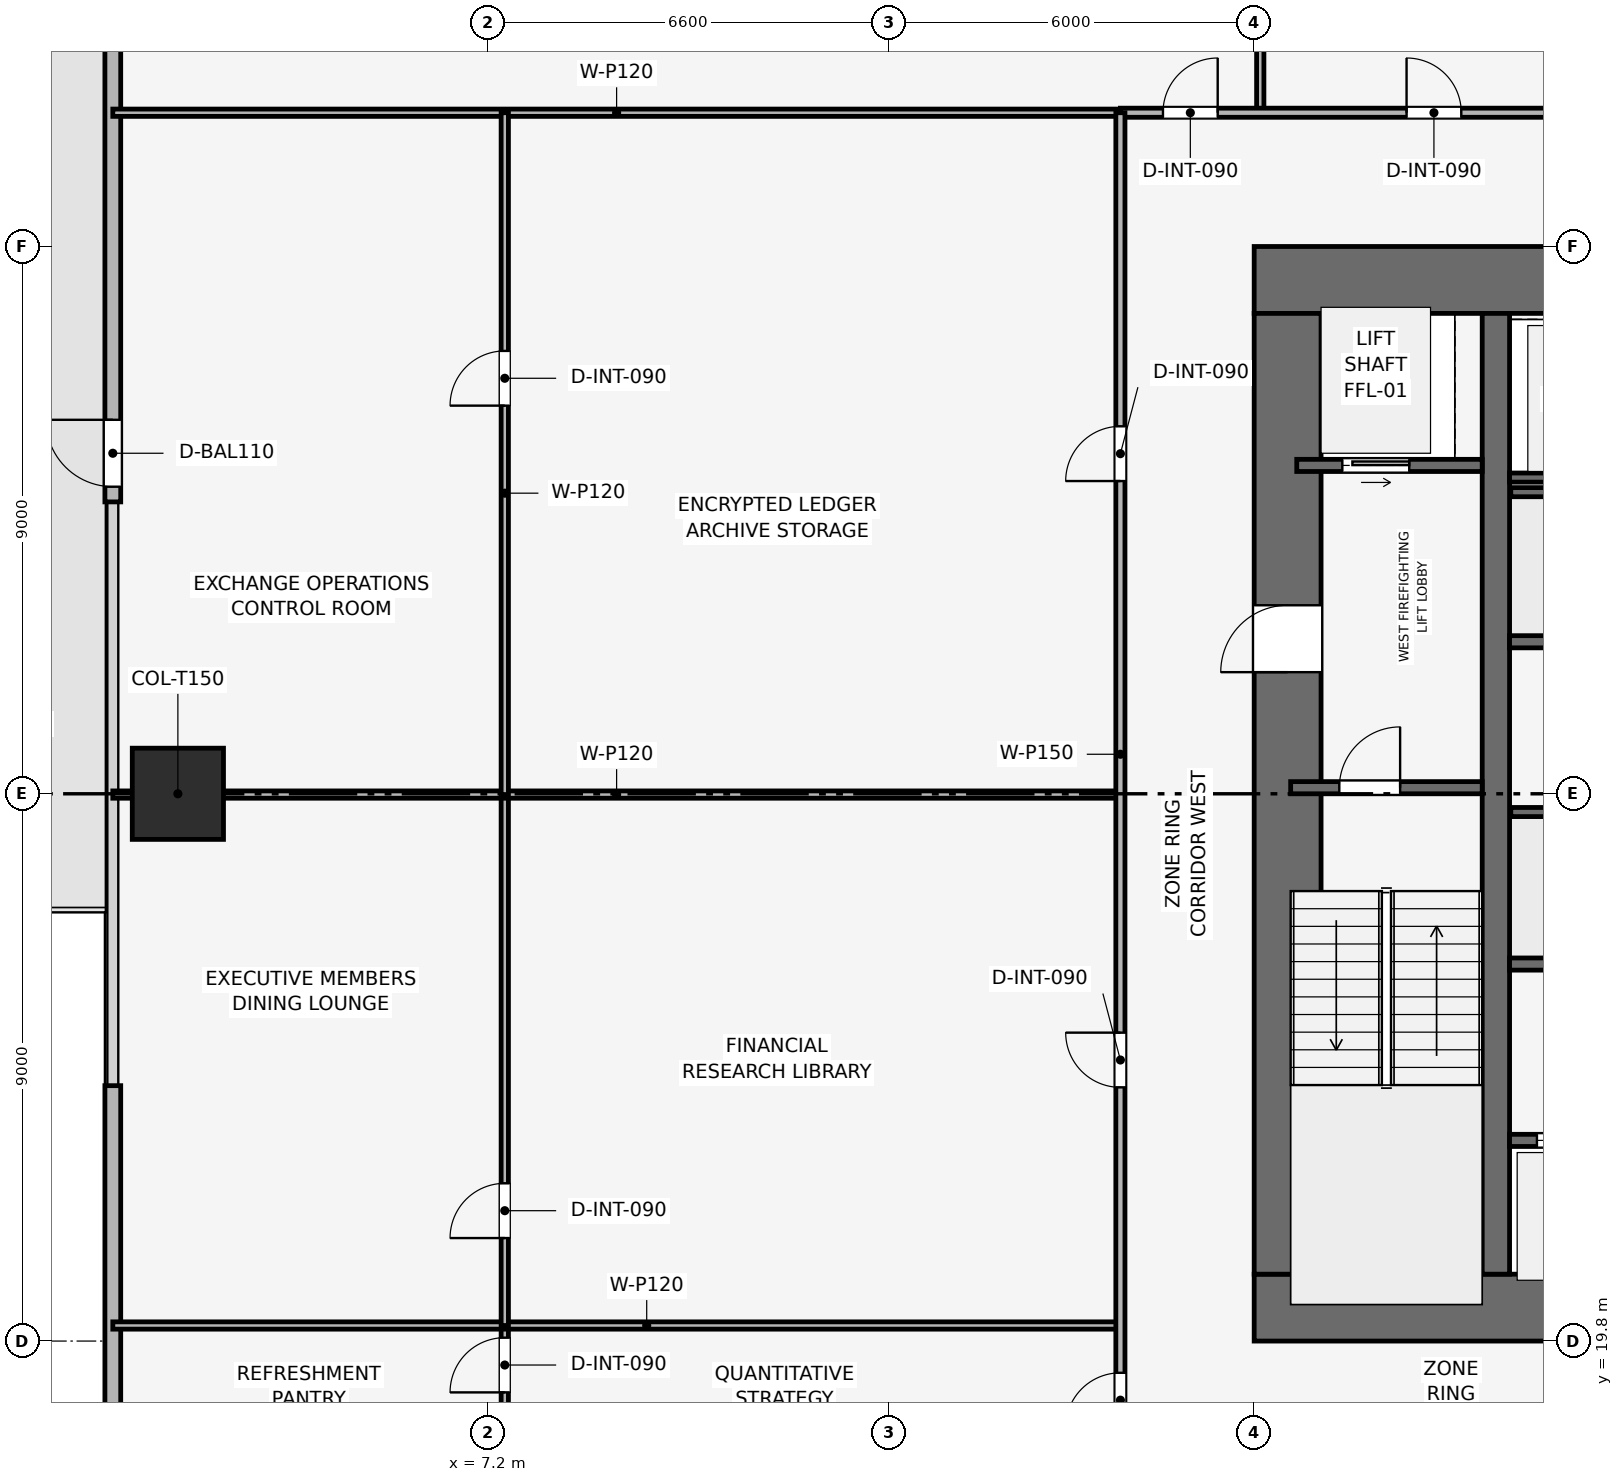
"""IFC4 building model, lengths in metres.
Left out: names, types, materials, properties, quantities, classifications, styles, units other than length and angle.
Written with IfcOpenShell. Run it as: python <this file> out.ifc"""

import sys

from ifc_helpers import new_model, si_unit, direction, frame, frame_2d, origin, origin_2d, place, context, subcontext, project, spatial, rectangle, extrude, element, fill, save


model = new_model("IFC4")
c1 = context("Model", 3, precision=1e-05, world=origin(), true_north=direction((0.0, 1.0)))
c2 = subcontext(c1, "Body", "Model", "MODEL_VIEW")
j1 = project(units=[si_unit("LENGTHUNIT", "METRE"), si_unit("PLANEANGLEUNIT", "RADIAN")], contexts=[c1])
p1 = place(None, origin())
s1 = spatial("IfcSite", under=j1, at=p1, CompositionType="ELEMENT")
p2 = place(p1, origin())
s2 = spatial("IfcBuilding", under=s1, at=p2, CompositionType="ELEMENT")
p3 = place(p2, frame((0.0, 0.0, 100.2)))
s3 = spatial("IfcBuildingStorey", under=s2, at=p3, CompositionType="ELEMENT", Elevation=100.2)
p4 = place(p3, frame((19.8, 20.35, 0.0), z_axis=(0.0, 0.0, 1.0), x_axis=(1.0, 0.0, 0.0)))
e1 = element("IfcWall", 1, at=p4, inside=s3, PredefinedType="SHEAR", context=c2, shape_type="SweptSolid", body=[
    extrude(rectangle(XDim=18.0, YDim=1.1, at=frame_2d((9.0, 0.0))), origin(), (0.0, 0.0, 1.0), 3.9),
])
p5 = place(p4, frame((8.4, 0.0, 0.0)))
e2 = element("IfcOpeningElement", 2, at=p5, cuts=e1, PredefinedType="OPENING", context=c2, shape_type="SweptSolid", body=[
    extrude(rectangle(XDim=1.2, YDim=2.2, at=frame_2d((0.6, 1.1))), frame((0.0, 0.56, 0.0), z_axis=(0.0, -1.0, 0.0), x_axis=(1.0, 0.0, 0.0)), (0.0, 0.0, 1.0), 1.12),
])
p6 = place(p3, frame((19.8, 37.25, 0.0), z_axis=(0.0, 0.0, 1.0), x_axis=(1.0, 0.0, 0.0)))
e3 = element("IfcWall", 3, at=p6, inside=s3, PredefinedType="SHEAR", context=c2, shape_type="SweptSolid", body=[
    extrude(rectangle(XDim=18.0, YDim=1.1, at=frame_2d((9.0, 0.0))), origin(), (0.0, 0.0, 1.0), 3.9),
])
p7 = place(p6, frame((7.05, 0.0, 0.0)))
e4 = element("IfcOpeningElement", 4, at=p7, cuts=e3, PredefinedType="OPENING", context=c2, shape_type="SweptSolid", body=[
    extrude(rectangle(XDim=1.1, YDim=2.15, at=frame_2d((0.55, 1.075))), frame((0.0, 0.56, 0.0), z_axis=(0.0, -1.0, 0.0), x_axis=(1.0, 0.0, 0.0)), (0.0, 0.0, 1.0), 1.12),
])
p8 = place(p3, frame((20.35, 20.9, 0.0), z_axis=(0.0, 0.0, 1.0), x_axis=(0.0, 1.0, 0.0)))
e5 = element("IfcWall", 5, at=p8, inside=s3, PredefinedType="SHEAR", context=c2, shape_type="SweptSolid", body=[
    extrude(rectangle(XDim=15.8, YDim=1.1, at=frame_2d((7.9, 0.0))), origin(), (0.0, 0.0, 1.0), 3.9),
])
p9 = place(p8, frame((9.9, 0.0, 0.0)))
e6 = element("IfcOpeningElement", 6, at=p9, cuts=e5, PredefinedType="OPENING", context=c2, shape_type="SweptSolid", body=[
    extrude(rectangle(XDim=1.1, YDim=2.15, at=frame_2d((0.55, 1.075))), frame((0.0, 0.56, 0.0), z_axis=(0.0, -1.0, 0.0), x_axis=(1.0, 0.0, 0.0)), (0.0, 0.0, 1.0), 1.12),
])
p10 = place(p3, frame((23.775, 20.9, 0.0), z_axis=(0.0, 0.0, 1.0), x_axis=(0.0, 1.0, 0.0)))
e7 = element("IfcWall", 7, at=p10, inside=s3, PredefinedType="SHEAR", context=c2, shape_type="SweptSolid", body=[
    extrude(rectangle(XDim=15.8, YDim=0.45, at=frame_2d((7.9, 0.0))), origin(), (0.0, 0.0, 1.0), 3.9),
])
p11 = place(p3, frame((2.1, 28.8, 0.003), z_axis=(0.0, 0.0, 1.0), x_axis=(1.0, 0.0, 0.0)))
e8 = element("IfcColumn", 8, at=p11, inside=s3, PredefinedType="COLUMN", context=c2, shape_type="SweptSolid", body=[
    extrude(rectangle(XDim=1.5, YDim=1.5, at=origin_2d()), origin(), (0.0, 0.0, 1.0), 3.644),
])
p12 = place(p3, frame((1.03, 8.7, 0.0), z_axis=(0.0, 0.0, 1.0), x_axis=(0.0, 1.0, 0.0)))
e9 = element("IfcWall", 9, at=p12, inside=s3, PredefinedType="SOLIDWALL", context=c2, shape_type="SweptSolid", body=[
    extrude(rectangle(XDim=15.3, YDim=0.26, at=frame_2d((7.65, 0.0))), origin(), (0.0, 0.0, 1.0), 3.65),
])
p13 = place(p12, frame((0.25, 0.0, 0.9)))
e10 = element("IfcOpeningElement", 10, at=p13, cuts=e9, PredefinedType="OPENING", context=c2, shape_type="SweptSolid", body=[
    extrude(rectangle(XDim=3.8, YDim=1.9, at=frame_2d((1.9, 0.95))), frame((0.0, 0.14, 0.0), z_axis=(0.0, -1.0, 0.0), x_axis=(1.0, 0.0, 0.0)), (0.0, 0.0, 1.0), 0.28),
])
p14 = place(p3, frame((1.03, 33.6, 0.0), z_axis=(0.0, 0.0, 1.0), x_axis=(0.0, 1.0, 0.0)))
e11 = element("IfcWall", 11, at=p14, inside=s3, PredefinedType="SOLIDWALL", context=c2, shape_type="SweptSolid", body=[
    extrude(rectangle(XDim=15.3, YDim=0.26, at=frame_2d((7.65, 0.0))), origin(), (0.0, 0.0, 1.0), 3.65),
])
p15 = place(p14, frame((0.25, 0.0, 0.0)))
e12 = element("IfcOpeningElement", 12, at=p15, cuts=e11, PredefinedType="OPENING", context=c2, shape_type="SweptSolid", body=[
    extrude(rectangle(XDim=1.1, YDim=2.2, at=frame_2d((0.55, 1.1))), frame((0.0, 0.14, 0.0), z_axis=(0.0, -1.0, 0.0), x_axis=(1.0, 0.0, 0.0)), (0.0, 0.0, 1.0), 0.28),
])
p16 = place(p3, frame((20.4, 28.9, 0.0), z_axis=(0.0, 0.0, 1.0), x_axis=(1.0, 0.0, 0.0)))
e13 = element("IfcWall", 13, at=p16, inside=s3, PredefinedType="SHEAR", context=c2, shape_type="SweptSolid", body=[
    extrude(rectangle(XDim=3.15, YDim=0.2, at=frame_2d((1.575, 0.0))), origin(), (0.0, 0.0, 1.0), 3.65),
])
p17 = place(p16, frame((0.8, 0.0, 0.0)))
e14 = element("IfcOpeningElement", 14, at=p17, cuts=e13, PredefinedType="OPENING", context=c2, shape_type="SweptSolid", body=[
    extrude(rectangle(XDim=1.0, YDim=2.1, at=frame_2d((0.5, 1.05))), frame((0.0, 0.11, 0.0), z_axis=(0.0, -1.0, 0.0), x_axis=(1.0, 0.0, 0.0)), (0.0, 0.0, 1.0), 0.22),
])
p18 = place(p3, frame((20.5, 34.2, 0.0), z_axis=(0.0, 0.0, 1.0), x_axis=(1.0, 0.0, 0.0)))
e15 = element("IfcWall", 15, at=p18, inside=s3, PredefinedType="SHEAR", context=c2, shape_type="SweptSolid", body=[
    extrude(rectangle(XDim=3.05, YDim=0.2, at=frame_2d((1.525, 0.0))), origin(), (0.0, 0.0, 1.0), 3.65),
])
p19 = place(p18, frame((0.75, 0.0, 0.0)))
e16 = element("IfcOpeningElement", 16, at=p19, cuts=e15, PredefinedType="OPENING", context=c2, shape_type="SweptSolid", body=[
    extrude(rectangle(XDim=1.1, YDim=2.15, at=frame_2d((0.55, 1.075))), frame((0.0, 0.11, 0.0), z_axis=(0.0, -1.0, 0.0), x_axis=(1.0, 0.0, 0.0)), (0.0, 0.0, 1.0), 0.22),
])
p20 = place(p3, frame((24.0, 34.0, 0.0), z_axis=(0.0, 0.0, 1.0), x_axis=(1.0, 0.0, 0.0)))
e17 = element("IfcWall", 17, at=p20, inside=s3, PredefinedType="SHEAR", context=c2, shape_type="SweptSolid", body=[
    extrude(rectangle(XDim=2.48, YDim=0.15, at=frame_2d((1.24, 0.0))), origin(), (0.0, 0.0, 1.0), 3.65),
])
p21 = place(p3, frame((24.0, 23.1, 0.0), z_axis=(0.0, 0.0, 1.0), x_axis=(1.0, 0.0, 0.0)))
e18 = element("IfcWall", 18, at=p21, inside=s3, PredefinedType="SHEAR", context=c2, shape_type="SweptSolid", body=[
    extrude(rectangle(XDim=2.0, YDim=0.2, at=frame_2d((1.0, 0.0))), origin(), (0.0, 0.0, 1.0), 3.65),
])
p22 = place(p21, frame((0.45, 0.0, 0.0)))
e19 = element("IfcOpeningElement", 19, at=p22, cuts=e18, PredefinedType="OPENING", context=c2, shape_type="SweptSolid", body=[
    extrude(rectangle(XDim=1.1, YDim=2.15, at=frame_2d((0.55, 1.075))), frame((0.0, 0.11, 0.0), z_axis=(0.0, -1.0, 0.0), x_axis=(1.0, 0.0, 0.0)), (0.0, 0.0, 1.0), 0.22),
])
for number, where, z_axis, x_axis in (
    (20, (24.0, 26.0, 0.0), (0.0, 0.0, 1.0), (1.0, 0.0, 0.0)),
    (21, (24.0, 31.3, 0.0), (0.0, 0.0, 1.0), (1.0, 0.0, 0.0)),
):
    element("IfcWall", number, at=place(p3, frame(where, z_axis=z_axis, x_axis=x_axis)), inside=s3, PredefinedType="SHEAR", context=c2, shape_type="SweptSolid", body=[
        extrude(rectangle(XDim=2.0, YDim=0.2, at=frame_2d((1.0, 0.0))), origin(), (0.0, 0.0, 1.0), 3.65),
    ])
for number, where, z_axis, x_axis in (
    (22, (24.02, 28.5, 0.0), (0.0, 0.0, 1.0), (1.0, 0.0, 0.0)),
    (23, (24.02, 33.76, 0.0), (0.0, 0.0, 1.0), (1.0, 0.0, 0.0)),
):
    element("IfcWall", number, at=place(p3, frame(where, z_axis=z_axis, x_axis=x_axis)), inside=s3, PredefinedType="SHEAR", context=c2, shape_type="SweptSolid", body=[
        extrude(rectangle(XDim=4.08, YDim=0.15, at=frame_2d((2.04, 0.0))), origin(), (0.0, 0.0, 1.0), 3.65),
    ])
for number, where, z_axis, x_axis in (
    (24, (19.9, 40.0, 0.0), (0.0, 0.0, 1.0), (0.0, 1.0, 0.0)),
    (25, (1.03, 40.0, 0.0), (0.0, 0.0, 1.0), (1.0, 0.0, 0.0)),
):
    element("IfcWall", number, at=place(p3, frame(where, z_axis=z_axis, x_axis=x_axis)), inside=s3, PredefinedType="PARTITIONING", context=c2, shape_type="SweptSolid", body=[
        extrude(rectangle(XDim=16.57, YDim=0.12, at=frame_2d((8.285, 0.0))), origin(), (0.0, 0.0, 1.0), 2.935),
    ])
p23 = place(p3, frame((7.476, 17.6, 0.0), z_axis=(0.0, 0.0, 1.0), x_axis=(0.0, 1.0, 0.0)))
e26 = element("IfcWall", 26, at=p23, inside=s3, PredefinedType="PARTITIONING", context=c2, shape_type="SweptSolid", body=[
    extrude(rectangle(XDim=2.456, YDim=0.12, at=frame_2d((1.228, 0.0))), origin(), (0.0, 0.0, 1.0), 3.65),
])
p24 = place(p23, frame((1.356, 0.0, 0.0)))
e27 = element("IfcOpeningElement", 27, at=p24, cuts=e26, PredefinedType="OPENING", context=c2, shape_type="SweptSolid", body=[
    extrude(rectangle(XDim=0.9, YDim=2.1, at=frame_2d((0.45, 1.05))), frame((0.0, 0.07, 0.0), z_axis=(0.0, -1.0, 0.0), x_axis=(1.0, 0.0, 0.0)), (0.0, 0.0, 1.0), 0.14),
])
p25 = place(p3, frame((1.03, 20.056, 0.0), z_axis=(0.0, 0.0, 1.0), x_axis=(1.0, 0.0, 0.0)))
e28 = element("IfcWall", 28, at=p25, inside=s3, PredefinedType="PARTITIONING", context=c2, shape_type="SweptSolid", body=[
    extrude(rectangle(XDim=16.57, YDim=0.12, at=frame_2d((8.285, 0.0))), origin(), (0.0, 0.0, 1.0), 2.935),
])
p26 = place(p3, frame((7.476, 20.056, 0.0), z_axis=(0.0, 0.0, 1.0), x_axis=(0.0, 1.0, 0.0)))
e29 = element("IfcWall", 29, at=p26, inside=s3, PredefinedType="PARTITIONING", context=c2, shape_type="SweptSolid", body=[
    extrude(rectangle(XDim=8.731, YDim=0.12, at=frame_2d((4.366, 0.0))), origin(), (0.0, 0.0, 1.0), 3.085),
])
p27 = place(p26, frame((1.438, 0.0, 0.0)))
e30 = element("IfcOpeningElement", 30, at=p27, cuts=e29, PredefinedType="OPENING", context=c2, shape_type="SweptSolid", body=[
    extrude(rectangle(XDim=0.9, YDim=2.1, at=frame_2d((0.45, 1.05))), frame((0.0, 0.07, 0.0), z_axis=(0.0, -1.0, 0.0), x_axis=(1.0, 0.0, 0.0)), (0.0, 0.0, 1.0), 0.14),
])
p28 = place(p3, frame((1.03, 28.787, 0.0), z_axis=(0.0, 0.0, 1.0), x_axis=(1.0, 0.0, 0.0)))
e31 = element("IfcWall", 31, at=p28, inside=s3, PredefinedType="PARTITIONING", context=c2, shape_type="SweptSolid", body=[
    extrude(rectangle(XDim=16.57, YDim=0.12, at=frame_2d((8.285, 0.0))), origin(), (0.0, 0.0, 1.0), 3.085),
])
p29 = place(p3, frame((7.476, 28.787, 0.0), z_axis=(0.0, 0.0, 1.0), x_axis=(0.0, 1.0, 0.0)))
e32 = element("IfcWall", 32, at=p29, inside=s3, PredefinedType="PARTITIONING", context=c2, shape_type="SweptSolid", body=[
    extrude(rectangle(XDim=11.213, YDim=0.12, at=frame_2d((5.606, 0.0))), origin(), (0.0, 0.0, 1.0), 3.085),
])
p30 = place(p29, frame((6.396, 0.0, 0.0)))
e33 = element("IfcOpeningElement", 33, at=p30, cuts=e32, PredefinedType="OPENING", context=c2, shape_type="SweptSolid", body=[
    extrude(rectangle(XDim=0.9, YDim=2.1, at=frame_2d((0.45, 1.05))), frame((0.0, 0.07, 0.0), z_axis=(0.0, -1.0, 0.0), x_axis=(1.0, 0.0, 0.0)), (0.0, 0.0, 1.0), 0.14),
])
p31 = place(p3, frame((17.6, 40.0, 0.0), z_axis=(0.0, 0.0, 1.0), x_axis=(1.0, 0.0, 0.0)))
e34 = element("IfcWall", 34, at=p31, inside=s3, PredefinedType="PARTITIONING", context=c2, shape_type="SweptSolid", body=[
    extrude(rectangle(XDim=22.4, YDim=0.15, at=frame_2d((11.2, 0.0))), origin(), (0.0, 0.0, 1.0), 3.085),
])
p32 = place(p31, frame((0.7, 0.0, 0.0)))
e35 = element("IfcOpeningElement", 35, at=p32, cuts=e34, PredefinedType="OPENING", context=c2, shape_type="SweptSolid", body=[
    extrude(rectangle(XDim=0.9, YDim=2.1, at=frame_2d((0.45, 1.05))), frame((0.0, 0.085, 0.0), z_axis=(0.0, -1.0, 0.0), x_axis=(1.0, 0.0, 0.0)), (0.0, 0.0, 1.0), 0.17),
])
p33 = place(p31, frame((4.706, 0.0, 0.0)))
e36 = element("IfcOpeningElement", 36, at=p33, cuts=e34, PredefinedType="OPENING", context=c2, shape_type="SweptSolid", body=[
    extrude(rectangle(XDim=0.9, YDim=2.1, at=frame_2d((0.45, 1.05))), frame((0.0, 0.085, 0.0), z_axis=(0.0, -1.0, 0.0), x_axis=(1.0, 0.0, 0.0)), (0.0, 0.0, 1.0), 0.17),
])
p34 = place(p31, frame((10.704, 0.0, 0.0)))
e37 = element("IfcOpeningElement", 37, at=p34, cuts=e34, PredefinedType="OPENING", context=c2, shape_type="SweptSolid", body=[
    extrude(rectangle(XDim=0.9, YDim=2.1, at=frame_2d((0.45, 1.05))), frame((0.0, 0.085, 0.0), z_axis=(0.0, -1.0, 0.0), x_axis=(1.0, 0.0, 0.0)), (0.0, 0.0, 1.0), 0.17),
])
p35 = place(p31, frame((17.898, 0.0, 0.0)))
e38 = element("IfcOpeningElement", 38, at=p35, cuts=e34, PredefinedType="OPENING", context=c2, shape_type="SweptSolid", body=[
    extrude(rectangle(XDim=0.9, YDim=2.1, at=frame_2d((0.45, 1.05))), frame((0.0, 0.085, 0.0), z_axis=(0.0, -1.0, 0.0), x_axis=(1.0, 0.0, 0.0)), (0.0, 0.0, 1.0), 0.17),
])
p36 = place(p3, frame((17.6, 17.6, 0.0), z_axis=(0.0, 0.0, 1.0), x_axis=(0.0, 1.0, 0.0)))
e39 = element("IfcWall", 39, at=p36, inside=s3, PredefinedType="PARTITIONING", context=c2, shape_type="SweptSolid", body=[
    extrude(rectangle(XDim=22.4, YDim=0.15, at=frame_2d((11.2, 0.0))), origin(), (0.0, 0.0, 1.0), 3.085),
])
p37 = place(p36, frame((0.778, 0.0, 0.0)))
e40 = element("IfcOpeningElement", 40, at=p37, cuts=e39, PredefinedType="OPENING", context=c2, shape_type="SweptSolid", body=[
    extrude(rectangle(XDim=0.9, YDim=2.1, at=frame_2d((0.45, 1.05))), frame((0.0, 0.085, 0.0), z_axis=(0.0, -1.0, 0.0), x_axis=(1.0, 0.0, 0.0)), (0.0, 0.0, 1.0), 0.17),
])
p38 = place(p36, frame((6.372, 0.0, 0.0)))
e41 = element("IfcOpeningElement", 41, at=p38, cuts=e39, PredefinedType="OPENING", context=c2, shape_type="SweptSolid", body=[
    extrude(rectangle(XDim=0.9, YDim=2.1, at=frame_2d((0.45, 1.05))), frame((0.0, 0.085, 0.0), z_axis=(0.0, -1.0, 0.0), x_axis=(1.0, 0.0, 0.0)), (0.0, 0.0, 1.0), 0.17),
])
p39 = place(p36, frame((16.343, 0.0, 0.0)))
e42 = element("IfcOpeningElement", 42, at=p39, cuts=e39, PredefinedType="OPENING", context=c2, shape_type="SweptSolid", body=[
    extrude(rectangle(XDim=0.9, YDim=2.1, at=frame_2d((0.45, 1.05))), frame((0.0, 0.085, 0.0), z_axis=(0.0, -1.0, 0.0), x_axis=(1.0, 0.0, 0.0)), (0.0, 0.0, 1.0), 0.17),
])
p40 = place(p15, origin())
e43 = element("IfcDoor", 43, at=p40, inside=s3, OperationType="SINGLE_SWING_RIGHT", PredefinedType="DOOR", context=c2, shape_type="SweptSolid", body=[
    extrude(rectangle(XDim=1.1, YDim=2.2, at=frame_2d((0.55, 1.1))), frame((0.0, 0.025, 0.0), z_axis=(0.0, -1.0, 0.0), x_axis=(1.0, 0.0, 0.0)), (0.0, 0.0, 1.0), 0.05),
])
fill(e12, e43)
p41 = place(p17, origin())
e44 = element("IfcDoor", 44, at=p41, inside=s3, OperationType="SINGLE_SWING_RIGHT", PredefinedType="DOOR", context=c2, shape_type="SweptSolid", body=[
    extrude(rectangle(XDim=1.0, YDim=2.1, at=frame_2d((0.5, 1.05))), frame((0.0, 0.025, 0.0), z_axis=(0.0, -1.0, 0.0), x_axis=(1.0, 0.0, 0.0)), (0.0, 0.0, 1.0), 0.05),
])
fill(e14, e44)
p42 = place(p19, origin())
e45 = element("IfcDoor", 45, at=p42, inside=s3, OperationType="SLIDING_TO_RIGHT", PredefinedType="DOOR", context=c2, shape_type="SweptSolid", body=[
    extrude(rectangle(XDim=1.1, YDim=2.15, at=frame_2d((0.55, 1.075))), frame((0.0, 0.025, 0.0), z_axis=(0.0, -1.0, 0.0), x_axis=(1.0, 0.0, 0.0)), (0.0, 0.0, 1.0), 0.05),
])
fill(e16, e45)
p43 = place(p22, origin())
e46 = element("IfcDoor", 46, at=p43, inside=s3, OperationType="SLIDING_TO_RIGHT", PredefinedType="DOOR", context=c2, shape_type="SweptSolid", body=[
    extrude(rectangle(XDim=1.1, YDim=2.15, at=frame_2d((0.55, 1.075))), frame((0.0, 0.025, 0.0), z_axis=(0.0, -1.0, 0.0), x_axis=(1.0, 0.0, 0.0)), (0.0, 0.0, 1.0), 0.05),
])
fill(e19, e46)
p44 = place(p24, origin())
e47 = element("IfcDoor", 47, at=p44, inside=s3, OperationType="SINGLE_SWING_LEFT", PredefinedType="DOOR", context=c2, shape_type="SweptSolid", body=[
    extrude(rectangle(XDim=0.9, YDim=2.1, at=frame_2d((0.45, 1.05))), frame((0.0, 0.025, 0.0), z_axis=(0.0, -1.0, 0.0), x_axis=(1.0, 0.0, 0.0)), (0.0, 0.0, 1.0), 0.05),
])
fill(e27, e47)
p45 = place(p27, origin())
e48 = element("IfcDoor", 48, at=p45, inside=s3, OperationType="SINGLE_SWING_LEFT", PredefinedType="DOOR", context=c2, shape_type="SweptSolid", body=[
    extrude(rectangle(XDim=0.9, YDim=2.1, at=frame_2d((0.45, 1.05))), frame((0.0, 0.025, 0.0), z_axis=(0.0, -1.0, 0.0), x_axis=(1.0, 0.0, 0.0)), (0.0, 0.0, 1.0), 0.05),
])
fill(e30, e48)
p46 = place(p30, origin())
e49 = element("IfcDoor", 49, at=p46, inside=s3, OperationType="SINGLE_SWING_LEFT", PredefinedType="DOOR", context=c2, shape_type="SweptSolid", body=[
    extrude(rectangle(XDim=0.9, YDim=2.1, at=frame_2d((0.45, 1.05))), frame((0.0, 0.025, 0.0), z_axis=(0.0, -1.0, 0.0), x_axis=(1.0, 0.0, 0.0)), (0.0, 0.0, 1.0), 0.05),
])
fill(e33, e49)
p47 = place(p32, origin())
e50 = element("IfcDoor", 50, at=p47, inside=s3, OperationType="SINGLE_SWING_RIGHT", PredefinedType="DOOR", context=c2, shape_type="SweptSolid", body=[
    extrude(rectangle(XDim=0.9, YDim=2.1, at=frame_2d((0.45, 1.05))), frame((0.0, 0.025, 0.0), z_axis=(0.0, -1.0, 0.0), x_axis=(1.0, 0.0, 0.0)), (0.0, 0.0, 1.0), 0.05),
])
fill(e35, e50)
p48 = place(p33, origin())
e51 = element("IfcDoor", 51, at=p48, inside=s3, OperationType="SINGLE_SWING_LEFT", PredefinedType="DOOR", context=c2, shape_type="SweptSolid", body=[
    extrude(rectangle(XDim=0.9, YDim=2.1, at=frame_2d((0.45, 1.05))), frame((0.0, 0.025, 0.0), z_axis=(0.0, -1.0, 0.0), x_axis=(1.0, 0.0, 0.0)), (0.0, 0.0, 1.0), 0.05),
])
fill(e36, e51)
p49 = place(p37, origin())
e52 = element("IfcDoor", 52, at=p49, inside=s3, OperationType="SINGLE_SWING_LEFT", PredefinedType="DOOR", context=c2, shape_type="SweptSolid", body=[
    extrude(rectangle(XDim=0.9, YDim=2.1, at=frame_2d((0.45, 1.05))), frame((0.0, 0.025, 0.0), z_axis=(0.0, -1.0, 0.0), x_axis=(1.0, 0.0, 0.0)), (0.0, 0.0, 1.0), 0.05),
])
fill(e40, e52)
p50 = place(p38, origin())
e53 = element("IfcDoor", 53, at=p50, inside=s3, OperationType="SINGLE_SWING_RIGHT", PredefinedType="DOOR", context=c2, shape_type="SweptSolid", body=[
    extrude(rectangle(XDim=0.9, YDim=2.1, at=frame_2d((0.45, 1.05))), frame((0.0, 0.025, 0.0), z_axis=(0.0, -1.0, 0.0), x_axis=(1.0, 0.0, 0.0)), (0.0, 0.0, 1.0), 0.05),
])
fill(e41, e53)
p51 = place(p39, origin())
e54 = element("IfcDoor", 54, at=p51, inside=s3, OperationType="SINGLE_SWING_LEFT", PredefinedType="DOOR", context=c2, shape_type="SweptSolid", body=[
    extrude(rectangle(XDim=0.9, YDim=2.1, at=frame_2d((0.45, 1.05))), frame((0.0, 0.025, 0.0), z_axis=(0.0, -1.0, 0.0), x_axis=(1.0, 0.0, 0.0)), (0.0, 0.0, 1.0), 0.05),
])
fill(e42, e54)
p52 = place(p9, origin())
e55 = element("IfcDoor", 55, at=p52, inside=s3, OperationType="SINGLE_SWING_LEFT", PredefinedType="DOOR", context=c2, shape_type="SweptSolid", body=[
    extrude(rectangle(XDim=1.1, YDim=2.15, at=frame_2d((0.55, 1.075))), frame((0.0, 0.025, 0.0), z_axis=(0.0, -1.0, 0.0), x_axis=(1.0, 0.0, 0.0)), (0.0, 0.0, 1.0), 0.05),
])
fill(e6, e55)
save(model, sys.argv[1])
